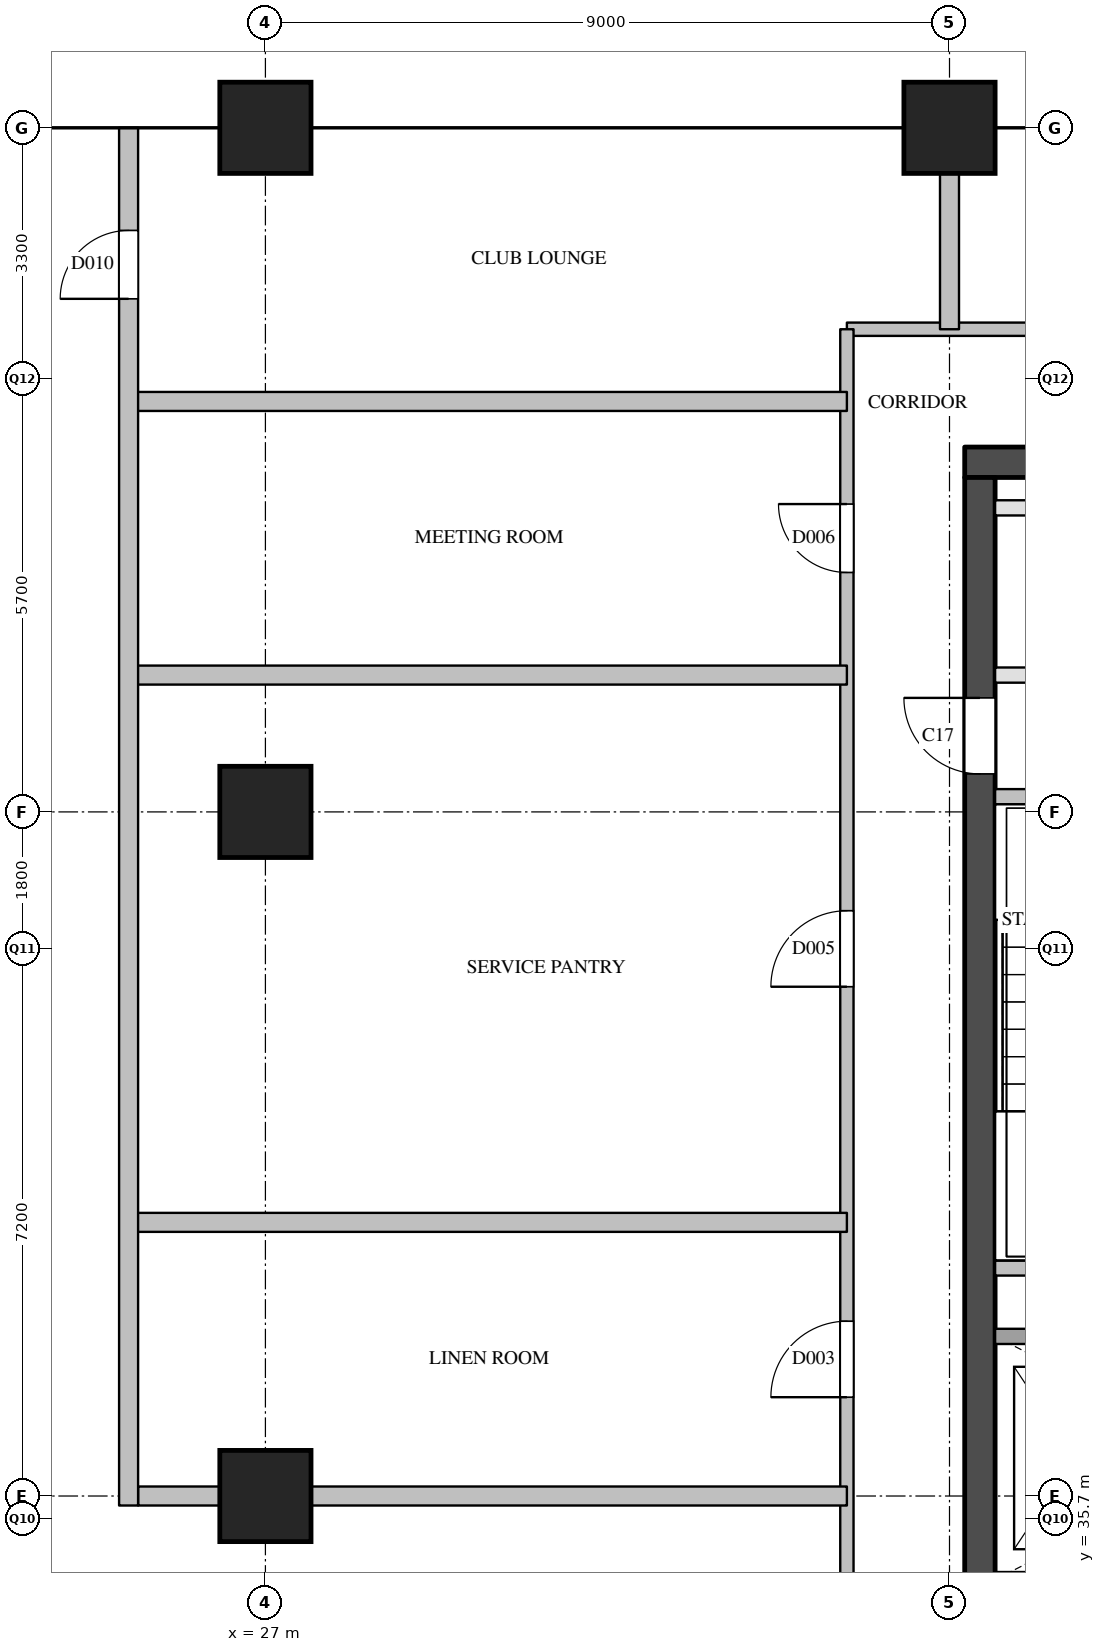
"""IFC4 building model, lengths in metres.
Left out: names, types, materials, properties, quantities, classifications, styles, units other than length and angle.
Written with IfcOpenShell. Run it as: python <this file> out.ifc"""

import sys

from ifc_helpers import new_model, si_unit, direction, frame, frame_2d, origin, origin_2d, place, context, subcontext, project, spatial, rectangle, extrude, element, fill, save


model = new_model("IFC4")
c1 = context("Model", 3, precision=1e-05, world=origin(), true_north=direction((0.0, 1.0)))
c2 = subcontext(c1, "Body", "Model", "MODEL_VIEW")
j1 = project(units=[si_unit("LENGTHUNIT", "METRE"), si_unit("PLANEANGLEUNIT", "RADIAN")], contexts=[c1])
p1 = place(None, origin())
s1 = spatial("IfcSite", under=j1, at=p1, CompositionType="ELEMENT")
p2 = place(p1, origin())
s2 = spatial("IfcBuilding", under=s1, at=p2, CompositionType="ELEMENT")
p3 = place(p2, frame((0.0, 0.0, 285.2)))
s3 = spatial("IfcBuildingStorey", under=s2, at=p3, CompositionType="ELEMENT", Elevation=285.2)
for number, where, z_axis, x_axis in (
    (1, (27.0, 36.0, 0.0), (0.0, 0.0, 1.0), (1.0, 0.0, 0.0)),
    (2, (27.0, 45.0, 0.0), (0.0, 0.0, 1.0), (1.0, 0.0, 0.0)),
    (3, (27.0, 54.0, 0.0), (0.0, 0.0, 1.0), (1.0, 0.0, 0.0)),
    (4, (36.0, 54.0, 0.0), (0.0, 0.0, 1.0), (1.0, 0.0, 0.0)),
):
    element("IfcColumn", number, at=place(p3, frame(where, z_axis=z_axis, x_axis=x_axis)), inside=s3, PredefinedType="COLUMN", context=c2, shape_type="SweptSolid", body=[
        extrude(rectangle(XDim=1.2, YDim=1.2, at=origin_2d()), origin(), (0.0, 0.0, 1.0), 5.0),
    ])
p4 = place(p3, frame((36.2, 49.6, 0.0), z_axis=(0.0, 0.0, 1.0), x_axis=(1.0, 0.0, 0.0)))
e5 = element("IfcWall", 5, at=p4, inside=s3, PredefinedType="SHEAR", context=c2, shape_type="SweptSolid", body=[
    extrude(rectangle(XDim=12.0, YDim=0.4, at=frame_2d((6.0, 0.0))), origin(), (0.0, 0.0, 1.0), 4.7),
])
p5 = place(p3, frame((36.4, 29.1, 0.0), z_axis=(0.0, 0.0, 1.0), x_axis=(0.0, 1.0, 0.0)))
e6 = element("IfcWall", 6, at=p5, inside=s3, PredefinedType="SHEAR", context=c2, shape_type="SweptSolid", body=[
    extrude(rectangle(XDim=20.3, YDim=0.4, at=frame_2d((10.15, 0.0))), origin(), (0.0, 0.0, 1.0), 4.7),
])
p6 = place(p5, frame((3.6, 0.0, 0.0)))
e7 = element("IfcOpeningElement", 7, at=p6, cuts=e6, PredefinedType="OPENING", context=c2, shape_type="SweptSolid", body=[
    extrude(rectangle(XDim=1.8, YDim=2.1, at=frame_2d((0.9, 1.05))), frame((0.0, 0.21, 0.0), z_axis=(0.0, -1.0, 0.0), x_axis=(1.0, 0.0, 0.0)), (0.0, 0.0, 1.0), 0.42),
])
p7 = place(p5, frame((16.4, 0.0, 0.0)))
e8 = element("IfcOpeningElement", 8, at=p7, cuts=e6, PredefinedType="OPENING", context=c2, shape_type="SweptSolid", body=[
    extrude(rectangle(XDim=1.0, YDim=2.1, at=frame_2d((0.5, 1.05))), frame((0.0, 0.21, 0.0), z_axis=(0.0, -1.0, 0.0), x_axis=(1.0, 0.0, 0.0)), (0.0, 0.0, 1.0), 0.42),
])
p8 = place(p3, frame((36.6, 38.1, 0.0), z_axis=(0.0, 0.0, 1.0), x_axis=(1.0, 0.0, 0.0)))
e9 = element("IfcWall", 9, at=p8, inside=s3, PredefinedType="SOLIDWALL", context=c2, shape_type="SweptSolid", body=[
    extrude(rectangle(XDim=6.7, YDim=0.2, at=frame_2d((3.35, 0.0))), origin(), (0.0, 0.0, 1.0), 4.7),
])
p9 = place(p8, frame((0.45, 0.0, 0.0)))
e10 = element("IfcOpeningElement", 10, at=p9, cuts=e9, PredefinedType="OPENING", context=c2, shape_type="SweptSolid", body=[
    extrude(rectangle(XDim=1.2, YDim=2.1, at=frame_2d((0.6, 1.05))), frame((0.0, 0.11, 0.0), z_axis=(0.0, -1.0, 0.0), x_axis=(1.0, 0.0, 0.0)), (0.0, 0.0, 1.0), 0.22),
])
p10 = place(p8, frame((2.55, 0.0, 0.0)))
e11 = element("IfcOpeningElement", 11, at=p10, cuts=e9, PredefinedType="OPENING", context=c2, shape_type="SweptSolid", body=[
    extrude(rectangle(XDim=1.2, YDim=2.1, at=frame_2d((0.6, 1.05))), frame((0.0, 0.11, 0.0), z_axis=(0.0, -1.0, 0.0), x_axis=(1.0, 0.0, 0.0)), (0.0, 0.0, 1.0), 0.22),
])
p11 = place(p8, frame((4.65, 0.0, 0.0)))
e12 = element("IfcOpeningElement", 12, at=p11, cuts=e9, PredefinedType="OPENING", context=c2, shape_type="SweptSolid", body=[
    extrude(rectangle(XDim=1.2, YDim=2.1, at=frame_2d((0.6, 1.05))), frame((0.0, 0.11, 0.0), z_axis=(0.0, -1.0, 0.0), x_axis=(1.0, 0.0, 0.0)), (0.0, 0.0, 1.0), 0.22),
])
p12 = place(p3, frame((36.6, 39.0, 0.0), z_axis=(0.0, 0.0, 1.0), x_axis=(1.0, 0.0, 0.0)))
e13 = element("IfcWall", 13, at=p12, inside=s3, PredefinedType="SOLIDWALL", context=c2, shape_type="SweptSolid", body=[
    extrude(rectangle(XDim=3.25, YDim=0.2, at=frame_2d((1.625, 0.0))), origin(), (0.0, 0.0, 1.0), 4.7),
])
p13 = place(p3, frame((36.6, 45.2, 0.0), z_axis=(0.0, 0.0, 1.0), x_axis=(1.0, 0.0, 0.0)))
e14 = element("IfcWall", 14, at=p13, inside=s3, PredefinedType="SOLIDWALL", context=c2, shape_type="SweptSolid", body=[
    extrude(rectangle(XDim=3.25, YDim=0.2, at=frame_2d((1.625, 0.0))), origin(), (0.0, 0.0, 1.0), 4.7),
])
p14 = place(p13, frame((1.125, 0.0, 0.0)))
e15 = element("IfcOpeningElement", 15, at=p14, cuts=e14, PredefinedType="OPENING", context=c2, shape_type="SweptSolid", body=[
    extrude(rectangle(XDim=1.1, YDim=2.1, at=frame_2d((0.55, 1.05))), frame((0.0, 0.11, 0.0), z_axis=(0.0, -1.0, 0.0), x_axis=(1.0, 0.0, 0.0)), (0.0, 0.0, 1.0), 0.22),
])
p15 = place(p3, frame((36.6, 46.8, 0.0), z_axis=(0.0, 0.0, 1.0), x_axis=(1.0, 0.0, 0.0)))
e16 = element("IfcWall", 16, at=p15, inside=s3, PredefinedType="PARTITIONING", context=c2, shape_type="SweptSolid", body=[
    extrude(rectangle(XDim=11.2, YDim=0.2, at=frame_2d((5.6, 0.0))), origin(), (0.0, 0.0, 1.0), 4.7),
])
p16 = place(p15, frame((3.75, 0.0, 0.0)))
e17 = element("IfcOpeningElement", 17, at=p16, cuts=e16, PredefinedType="OPENING", context=c2, shape_type="SweptSolid", body=[
    extrude(rectangle(XDim=0.9, YDim=2.1, at=frame_2d((0.45, 1.05))), frame((0.0, 0.11, 0.0), z_axis=(0.0, -1.0, 0.0), x_axis=(1.0, 0.0, 0.0)), (0.0, 0.0, 1.0), 0.22),
])
p17 = place(p15, frame((9.35, 0.0, 0.0)))
e18 = element("IfcOpeningElement", 18, at=p17, cuts=e16, PredefinedType="OPENING", context=c2, shape_type="SweptSolid", body=[
    extrude(rectangle(XDim=0.9, YDim=2.1, at=frame_2d((0.45, 1.05))), frame((0.0, 0.11, 0.0), z_axis=(0.0, -1.0, 0.0), x_axis=(1.0, 0.0, 0.0)), (0.0, 0.0, 1.0), 0.22),
])
p18 = place(p3, frame((36.6, 49.0, 0.0), z_axis=(0.0, 0.0, 1.0), x_axis=(1.0, 0.0, 0.0)))
e19 = element("IfcWall", 19, at=p18, inside=s3, PredefinedType="PARTITIONING", context=c2, shape_type="SweptSolid", body=[
    extrude(rectangle(XDim=11.2, YDim=0.2, at=frame_2d((5.6, 0.0))), origin(), (0.0, 0.0, 1.0), 4.7),
])
p19 = place(p3, frame((34.65, 51.35, 0.0), z_axis=(0.0, 0.0, 1.0), x_axis=(1.0, 0.0, 0.0)))
e20 = element("IfcWall", 20, at=p19, inside=s3, PredefinedType="PARTITIONING", context=c2, shape_type="SweptSolid", body=[
    extrude(rectangle(XDim=15.1, YDim=0.175, at=frame_2d((7.55, 0.0))), origin(), (0.0, 0.0, 1.0), 4.7),
])
p20 = place(p19, frame((4.45, 0.0, 0.0)))
e21 = element("IfcOpeningElement", 21, at=p20, cuts=e20, PredefinedType="OPENING", context=c2, shape_type="SweptSolid", body=[
    extrude(rectangle(XDim=1.0, YDim=2.1, at=frame_2d((0.5, 1.05))), frame((0.0, 0.097, 0.0), z_axis=(0.0, -1.0, 0.0), x_axis=(1.0, 0.0, 0.0)), (0.0, 0.0, 1.0), 0.195),
])
p21 = place(p19, frame((11.294, 0.0, 0.0)))
e22 = element("IfcOpeningElement", 22, at=p21, cuts=e20, PredefinedType="OPENING", context=c2, shape_type="SweptSolid", body=[
    extrude(rectangle(XDim=0.9, YDim=2.1, at=frame_2d((0.45, 1.05))), frame((0.0, 0.097, 0.0), z_axis=(0.0, -1.0, 0.0), x_axis=(1.0, 0.0, 0.0)), (0.0, 0.0, 1.0), 0.195),
])
p22 = place(p3, frame((34.65, 28.5, 0.0), z_axis=(0.0, 0.0, 1.0), x_axis=(0.0, 1.0, 0.0)))
e23 = element("IfcWall", 23, at=p22, inside=s3, PredefinedType="PARTITIONING", context=c2, shape_type="SweptSolid", body=[
    extrude(rectangle(XDim=22.85, YDim=0.175, at=frame_2d((11.425, 0.0))), origin(), (0.0, 0.0, 1.0), 4.7),
])
p23 = place(p22, frame((3.3, 0.0, 0.0)))
e24 = element("IfcOpeningElement", 24, at=p23, cuts=e23, PredefinedType="OPENING", context=c2, shape_type="SweptSolid", body=[
    extrude(rectangle(XDim=0.9, YDim=2.1, at=frame_2d((0.45, 1.05))), frame((0.0, 0.097, 0.0), z_axis=(0.0, -1.0, 0.0), x_axis=(1.0, 0.0, 0.0)), (0.0, 0.0, 1.0), 0.195),
])
p24 = place(p22, frame((8.8, 0.0, 0.0)))
e25 = element("IfcOpeningElement", 25, at=p24, cuts=e23, PredefinedType="OPENING", context=c2, shape_type="SweptSolid", body=[
    extrude(rectangle(XDim=1.0, YDim=2.1, at=frame_2d((0.5, 1.05))), frame((0.0, 0.097, 0.0), z_axis=(0.0, -1.0, 0.0), x_axis=(1.0, 0.0, 0.0)), (0.0, 0.0, 1.0), 0.195),
])
p25 = place(p22, frame((14.2, 0.0, 0.0)))
e26 = element("IfcOpeningElement", 26, at=p25, cuts=e23, PredefinedType="OPENING", context=c2, shape_type="SweptSolid", body=[
    extrude(rectangle(XDim=1.0, YDim=2.1, at=frame_2d((0.5, 1.05))), frame((0.0, 0.097, 0.0), z_axis=(0.0, -1.0, 0.0), x_axis=(1.0, 0.0, 0.0)), (0.0, 0.0, 1.0), 0.195),
])
p26 = place(p22, frame((19.65, 0.0, 0.0)))
e27 = element("IfcOpeningElement", 27, at=p26, cuts=e23, PredefinedType="OPENING", context=c2, shape_type="SweptSolid", body=[
    extrude(rectangle(XDim=0.9, YDim=2.1, at=frame_2d((0.45, 1.05))), frame((0.0, 0.097, 0.0), z_axis=(0.0, -1.0, 0.0), x_axis=(1.0, 0.0, 0.0)), (0.0, 0.0, 1.0), 0.195),
])
p27 = place(p3, frame((25.325, 36.0, 0.0), z_axis=(0.0, 0.0, 1.0), x_axis=(1.0, 0.0, 0.0)))
e28 = element("IfcWall", 28, at=p27, inside=s3, PredefinedType="PARTITIONING", context=c2, shape_type="SweptSolid", body=[
    extrude(rectangle(XDim=9.325, YDim=0.25, at=frame_2d((4.663, 0.0))), origin(), (0.0, 0.0, 1.0), 4.7),
])
for number, where, z_axis, x_axis in (
    (29, (25.2, 39.6, 0.0), (0.0, 0.0, 1.0), (1.0, 0.0, 0.0)),
    (30, (25.2, 46.8, 0.0), (0.0, 0.0, 1.0), (1.0, 0.0, 0.0)),
    (31, (25.2, 50.4, 0.0), (0.0, 0.0, 1.0), (1.0, 0.0, 0.0)),
):
    element("IfcWall", number, at=place(p3, frame(where, z_axis=z_axis, x_axis=x_axis)), inside=s3, PredefinedType="PARTITIONING", context=c2, shape_type="SweptSolid", body=[
        extrude(rectangle(XDim=9.45, YDim=0.25, at=frame_2d((4.725, 0.0))), origin(), (0.0, 0.0, 1.0), 3.7),
    ])
p28 = place(p3, frame((25.2, 35.875, 0.0), z_axis=(0.0, 0.0, 1.0), x_axis=(0.0, 1.0, 0.0)))
e32 = element("IfcWall", 32, at=p28, inside=s3, PredefinedType="PARTITIONING", context=c2, shape_type="SweptSolid", body=[
    extrude(rectangle(XDim=18.125, YDim=0.25, at=frame_2d((9.062, 0.0))), origin(), (0.0, 0.0, 1.0), 3.7),
])
p29 = place(p28, frame((15.875, 0.0, 0.0)))
e33 = element("IfcOpeningElement", 33, at=p29, cuts=e32, PredefinedType="OPENING", context=c2, shape_type="SweptSolid", body=[
    extrude(rectangle(XDim=0.9, YDim=2.1, at=frame_2d((0.45, 1.05))), frame((0.0, 0.135, 0.0), z_axis=(0.0, -1.0, 0.0), x_axis=(1.0, 0.0, 0.0)), (0.0, 0.0, 1.0), 0.27),
])
p30 = place(p3, frame((36.0, 51.35, 0.0), z_axis=(0.0, 0.0, 1.0), x_axis=(0.0, 1.0, 0.0)))
e34 = element("IfcWall", 34, at=p30, inside=s3, PredefinedType="PARTITIONING", context=c2, shape_type="SweptSolid", body=[
    extrude(rectangle(XDim=2.65, YDim=0.25, at=frame_2d((1.325, 0.0))), origin(), (0.0, 0.0, 1.0), 4.7),
])
p31 = place(p7, origin())
e35 = element("IfcDoor", 35, at=p31, inside=s3, OperationType="SINGLE_SWING_RIGHT", PredefinedType="DOOR", context=c2, shape_type="SweptSolid", body=[
    extrude(rectangle(XDim=1.0, YDim=2.1, at=frame_2d((0.5, 1.05))), frame((0.0, 0.025, 0.0), z_axis=(0.0, -1.0, 0.0), x_axis=(1.0, 0.0, 0.0)), (0.0, 0.0, 1.0), 0.05),
])
fill(e8, e35)
p32 = place(p24, origin())
e36 = element("IfcDoor", 36, at=p32, inside=s3, OperationType="SINGLE_SWING_LEFT", PredefinedType="DOOR", context=c2, shape_type="SweptSolid", body=[
    extrude(rectangle(XDim=1.0, YDim=2.1, at=frame_2d((0.5, 1.05))), frame((0.0, 0.025, 0.0), z_axis=(0.0, -1.0, 0.0), x_axis=(1.0, 0.0, 0.0)), (0.0, 0.0, 1.0), 0.05),
])
fill(e25, e36)
p33 = place(p25, origin())
e37 = element("IfcDoor", 37, at=p33, inside=s3, OperationType="SINGLE_SWING_LEFT", PredefinedType="DOOR", context=c2, shape_type="SweptSolid", body=[
    extrude(rectangle(XDim=1.0, YDim=2.1, at=frame_2d((0.5, 1.05))), frame((0.0, 0.025, 0.0), z_axis=(0.0, -1.0, 0.0), x_axis=(1.0, 0.0, 0.0)), (0.0, 0.0, 1.0), 0.05),
])
fill(e26, e37)
p34 = place(p26, origin())
e38 = element("IfcDoor", 38, at=p34, inside=s3, OperationType="SINGLE_SWING_RIGHT", PredefinedType="DOOR", context=c2, shape_type="SweptSolid", body=[
    extrude(rectangle(XDim=0.9, YDim=2.1, at=frame_2d((0.45, 1.05))), frame((0.0, 0.025, 0.0), z_axis=(0.0, -1.0, 0.0), x_axis=(1.0, 0.0, 0.0)), (0.0, 0.0, 1.0), 0.05),
])
fill(e27, e38)
p35 = place(p29, origin())
e39 = element("IfcDoor", 39, at=p35, inside=s3, OperationType="SINGLE_SWING_LEFT", PredefinedType="DOOR", context=c2, shape_type="SweptSolid", body=[
    extrude(rectangle(XDim=0.9, YDim=2.1, at=frame_2d((0.45, 1.05))), frame((0.0, 0.025, 0.0), z_axis=(0.0, -1.0, 0.0), x_axis=(1.0, 0.0, 0.0)), (0.0, 0.0, 1.0), 0.05),
])
fill(e33, e39)
save(model, sys.argv[1])
